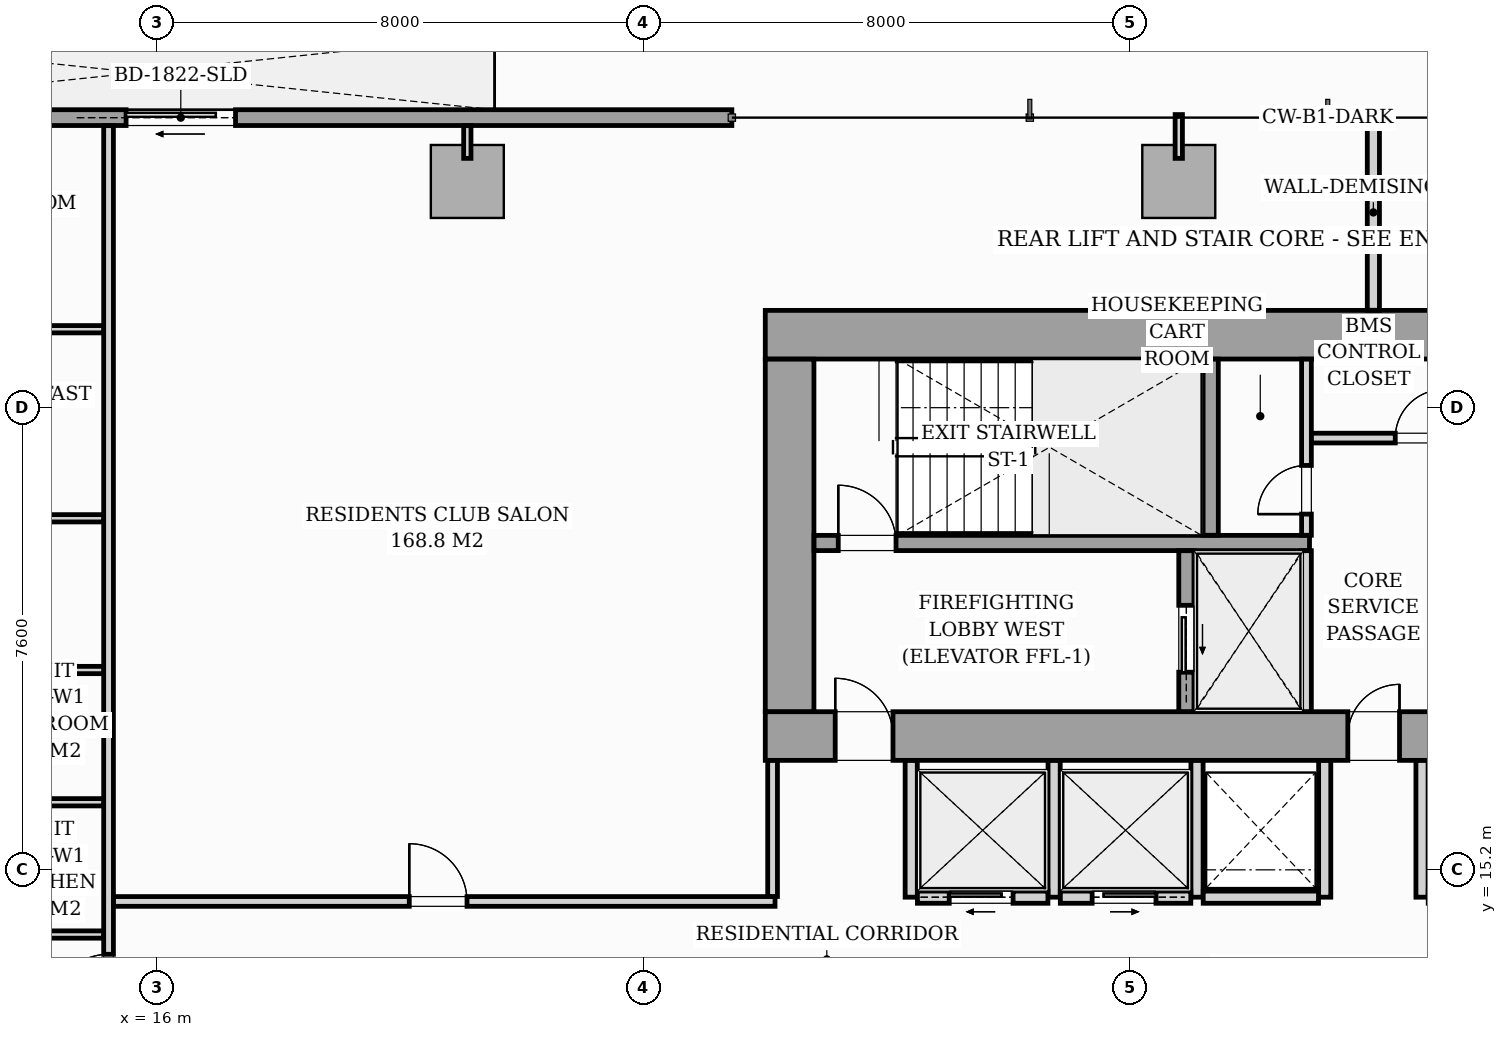
"""IFC4 building model, lengths in metres.
Left out: names, types, materials, properties, quantities, classifications, styles, units other than length and angle.
Written with IfcOpenShell. Run it as: python <this file> out.ifc"""

import sys

from ifc_helpers import new_model, si_unit, direction, frame, frame_2d, origin, origin_2d, place, context, subcontext, project, spatial, rectangle, i_section, extrude, source, transform, mapped, element, fill, save


model = new_model("IFC4")
c1 = context("Model", 3, precision=1e-05, world=origin(), true_north=direction((0.0, 1.0)))
c2 = subcontext(c1, "Body", "Model", "MODEL_VIEW")
j1 = project(units=[si_unit("LENGTHUNIT", "METRE"), si_unit("PLANEANGLEUNIT", "RADIAN")], contexts=[c1])
p1 = place(None, origin())
s1 = spatial("IfcSite", under=j1, at=p1, CompositionType="ELEMENT")
p2 = place(p1, origin())
s2 = spatial("IfcBuilding", under=s1, at=p2, CompositionType="ELEMENT")
p3 = place(p2, frame((0.0, 0.0, 23.0)))
s3 = spatial("IfcBuildingStorey", under=s2, at=p3, CompositionType="ELEMENT", Elevation=23.0)
m1 = source(origin(), c2, "Body", "SweptSolid", [
    extrude(i_section(OverallWidth=0.437, OverallDepth=0.514, WebThickness=0.061, FlangeThickness=0.097, FilletRadius=0.018, at=origin_2d()), origin(), (0.0, 0.0, 1.0), 3.196),
])
for number, where, z_axis, x_axis in (
    (1, (26.4, 17.4, 0.002), (0.0, 0.0, 1.0), (1.0, 0.0, 0.0)),
    (2, (33.12, 17.4, 0.002), (0.0, 0.0, 1.0), (1.0, 0.0, 0.0)),
    (3, (26.4, 24.0, 0.002), (0.0, 0.0, 1.0), (1.0, 0.0, 0.0)),
    (4, (33.12, 24.0, 0.002), (0.0, 0.0, 1.0), (1.0, 0.0, 0.0)),
):
    element("IfcColumn", number, at=place(p3, frame(where, z_axis=z_axis, x_axis=x_axis)), inside=s3, PredefinedType="PILASTER", context=c2, shape_type="MappedRepresentation", body=[
        mapped(m1, transform((0.0, 0.0, 0.0), scale=1.0)),
    ])
m2 = source(origin(), c2, "Body", "SweptSolid", [
    extrude(rectangle(XDim=1.2, YDim=1.2, at=origin_2d()), origin(), (0.0, 0.0, 1.0), 3.194),
])
for number, where, z_axis, x_axis in (
    (5, (21.1, 26.52, 0.004), (0.0, 0.0, 1.0), (1.0, 0.0, 0.0)),
    (6, (32.8, 26.52, 0.004), (0.0, 0.0, 1.0), (1.0, 0.0, 0.0)),
):
    element("IfcColumn", number, at=place(p3, frame(where, z_axis=z_axis, x_axis=x_axis)), inside=s3, PredefinedType="COLUMN", context=c2, shape_type="MappedRepresentation", body=[
        mapped(m2, transform((0.0, 0.0, 0.0), scale=1.0)),
    ])
p4 = place(p3, frame((8.3, 27.57, 0.0), z_axis=(0.0, 0.0, 1.0), x_axis=(1.0, 0.0, 0.0)))
e7 = element("IfcWall", 7, at=p4, inside=s3, PredefinedType="STANDARD", context=c2, shape_type="SweptSolid", body=[
    extrude(rectangle(XDim=17.15, YDim=0.26, at=frame_2d((8.575, 0.0))), origin(), (0.0, 0.0, 1.0), 2.94),
])
p5 = place(p4, frame((7.188, 0.0, 0.0)))
e8 = element("IfcOpeningElement", 8, at=p5, cuts=e7, PredefinedType="OPENING", context=c2, shape_type="SweptSolid", body=[
    extrude(rectangle(XDim=1.8, YDim=2.06, at=frame_2d((0.9, 1.03))), frame((0.0, 0.14, 0.0), z_axis=(0.0, -1.0, 0.0), x_axis=(1.0, 0.0, 0.0)), (0.0, 0.0, 1.0), 0.28),
])
p6 = place(p4, frame((2.05, 0.0, 0.65)))
e9 = element("IfcOpeningElement", 9, at=p6, cuts=e7, PredefinedType="OPENING", context=c2, shape_type="SweptSolid", body=[
    extrude(rectangle(XDim=1.6, YDim=1.5, at=frame_2d((0.8, 0.75))), frame((0.0, 0.14, 0.0), z_axis=(0.0, -1.0, 0.0), x_axis=(1.0, 0.0, 0.0)), (0.0, 0.0, 1.0), 0.28),
])
p7 = place(p3, frame((26.0, 17.4, 0.0), z_axis=(0.0, 0.0, 1.0), x_axis=(1.0, 0.0, 0.0)))
e10 = element("IfcWall", 10, at=p7, inside=s3, PredefinedType="SHEAR", context=c2, shape_type="SweptSolid", body=[
    extrude(rectangle(XDim=20.0, YDim=0.8, at=frame_2d((10.0, 0.0))), origin(), (0.0, 0.0, 1.0), 3.2),
])
p8 = place(p7, frame((1.15, 0.0, 0.0)))
e11 = element("IfcOpeningElement", 11, at=p8, cuts=e10, PredefinedType="OPENING", context=c2, shape_type="SweptSolid", body=[
    extrude(rectangle(XDim=0.95, YDim=2.06, at=frame_2d((0.475, 1.03))), frame((0.0, 0.41, 0.0), z_axis=(0.0, -1.0, 0.0), x_axis=(1.0, 0.0, 0.0)), (0.0, 0.0, 1.0), 0.82),
])
p9 = place(p7, frame((9.58, 0.0, 0.0)))
e12 = element("IfcOpeningElement", 12, at=p9, cuts=e10, PredefinedType="OPENING", context=c2, shape_type="SweptSolid", body=[
    extrude(rectangle(XDim=0.85, YDim=2.0, at=frame_2d((0.425, 1.0))), frame((0.0, 0.41, 0.0), z_axis=(0.0, -1.0, 0.0), x_axis=(1.0, 0.0, 0.0)), (0.0, 0.0, 1.0), 0.82),
])
p10 = place(p7, frame((17.75, 0.0, 0.0)))
e13 = element("IfcOpeningElement", 13, at=p10, cuts=e10, PredefinedType="OPENING", context=c2, shape_type="SweptSolid", body=[
    extrude(rectangle(XDim=0.95, YDim=2.06, at=frame_2d((0.475, 1.03))), frame((0.0, 0.41, 0.0), z_axis=(0.0, -1.0, 0.0), x_axis=(1.0, 0.0, 0.0)), (0.0, 0.0, 1.0), 0.82),
])
p11 = place(p3, frame((26.0, 24.0, 0.0), z_axis=(0.0, 0.0, 1.0), x_axis=(1.0, 0.0, 0.0)))
e14 = element("IfcWall", 14, at=p11, inside=s3, PredefinedType="SHEAR", context=c2, shape_type="SweptSolid", body=[
    extrude(rectangle(XDim=20.0, YDim=0.8, at=frame_2d((10.0, 0.0))), origin(), (0.0, 0.0, 1.0), 3.2),
])
p12 = place(p3, frame((26.4, 17.802, 0.0), z_axis=(0.0, 0.0, 1.0), x_axis=(0.0, 1.0, 0.0)))
e15 = element("IfcWall", 15, at=p12, inside=s3, PredefinedType="SHEAR", context=c2, shape_type="SweptSolid", body=[
    extrude(rectangle(XDim=5.796, YDim=0.8, at=frame_2d((2.898, 0.0))), origin(), (0.0, 0.0, 1.0), 3.2),
])
p13 = place(p3, frame((26.802, 20.575, 0.0), z_axis=(0.0, 0.0, 1.0), x_axis=(1.0, 0.0, 0.0)))
e16 = element("IfcWall", 16, at=p13, inside=s3, PredefinedType="SOLIDWALL", context=c2, shape_type="SweptSolid", body=[
    extrude(rectangle(XDim=8.148, YDim=0.25, at=frame_2d((4.074, 0.0))), origin(), (0.0, 0.0, 1.0), 3.2),
])
p14 = place(p13, frame((0.398, 0.0, 0.0)))
e17 = element("IfcOpeningElement", 17, at=p14, cuts=e16, PredefinedType="OPENING", context=c2, shape_type="SweptSolid", body=[
    extrude(rectangle(XDim=0.95, YDim=2.06, at=frame_2d((0.475, 1.03))), frame((0.0, 0.135, 0.0), z_axis=(0.0, -1.0, 0.0), x_axis=(1.0, 0.0, 0.0)), (0.0, 0.0, 1.0), 0.27),
])
p15 = place(p3, frame((33.325, 20.702, 0.0), z_axis=(0.0, 0.0, 1.0), x_axis=(0.0, 1.0, 0.0)))
e18 = element("IfcWall", 18, at=p15, inside=s3, PredefinedType="SOLIDWALL", context=c2, shape_type="SweptSolid", body=[
    extrude(rectangle(XDim=2.896, YDim=0.25, at=frame_2d((1.448, 0.0))), origin(), (0.0, 0.0, 1.0), 3.2),
])
p16 = place(p3, frame((32.925, 17.802, 0.0), z_axis=(0.0, 0.0, 1.0), x_axis=(0.0, 1.0, 0.0)))
e19 = element("IfcWall", 19, at=p16, inside=s3, PredefinedType="SOLIDWALL", context=c2, shape_type="SweptSolid", body=[
    extrude(rectangle(XDim=2.646, YDim=0.25, at=frame_2d((1.323, 0.0))), origin(), (0.0, 0.0, 1.0), 3.2),
])
p17 = place(p16, frame((0.648, 0.0, 0.0)))
e20 = element("IfcOpeningElement", 20, at=p17, cuts=e19, PredefinedType="OPENING", context=c2, shape_type="SweptSolid", body=[
    extrude(rectangle(XDim=1.1, YDim=2.08, at=frame_2d((0.55, 1.04))), frame((0.0, 0.135, 0.0), z_axis=(0.0, -1.0, 0.0), x_axis=(1.0, 0.0, 0.0)), (0.0, 0.0, 1.0), 0.27),
])
p18 = place(p3, frame((34.9, 17.802, 0.0), z_axis=(0.0, 0.0, 1.0), x_axis=(0.0, 1.0, 0.0)))
e21 = element("IfcWall", 21, at=p18, inside=s3, PredefinedType="PARTITIONING", context=c2, shape_type="SweptSolid", body=[
    extrude(rectangle(XDim=2.646, YDim=0.16, at=frame_2d((1.323, 0.0))), origin(), (0.0, 0.0, 1.0), 2.94),
])
p19 = place(p3, frame((34.9, 20.702, 0.0), z_axis=(0.0, 0.0, 1.0), x_axis=(0.0, 1.0, 0.0)))
e22 = element("IfcWall", 22, at=p19, inside=s3, PredefinedType="PARTITIONING", context=c2, shape_type="SweptSolid", body=[
    extrude(rectangle(XDim=2.896, YDim=0.16, at=frame_2d((1.448, 0.0))), origin(), (0.0, 0.0, 1.0), 2.94),
])
p20 = place(p19, frame((0.348, 0.0, 0.0)))
e23 = element("IfcOpeningElement", 23, at=p20, cuts=e22, PredefinedType="OPENING", context=c2, shape_type="SweptSolid", body=[
    extrude(rectangle(XDim=0.8, YDim=2.05, at=frame_2d((0.4, 1.025))), frame((0.0, 0.09, 0.0), z_axis=(0.0, -1.0, 0.0), x_axis=(1.0, 0.0, 0.0)), (0.0, 0.0, 1.0), 0.18),
])
p21 = place(p3, frame((34.982, 22.3, 0.0), z_axis=(0.0, 0.0, 1.0), x_axis=(1.0, 0.0, 0.0)))
e24 = element("IfcWall", 24, at=p21, inside=s3, PredefinedType="PARTITIONING", context=c2, shape_type="SweptSolid", body=[
    extrude(rectangle(XDim=3.566, YDim=0.16, at=frame_2d((1.783, 0.0))), origin(), (0.0, 0.0, 1.0), 2.94),
])
p22 = place(p21, frame((1.378, 0.0, 0.0)))
e25 = element("IfcOpeningElement", 25, at=p22, cuts=e24, PredefinedType="OPENING", context=c2, shape_type="SweptSolid", body=[
    extrude(rectangle(XDim=0.8, YDim=2.05, at=frame_2d((0.4, 1.025))), frame((0.0, 0.09, 0.0), z_axis=(0.0, -1.0, 0.0), x_axis=(1.0, 0.0, 0.0)), (0.0, 0.0, 1.0), 0.18),
])
for number, where, z_axis, x_axis in (
    (26, (28.4, 14.75, 0.0), (0.0, 0.0, 1.0), (0.0, 1.0, 0.0)),
    (27, (30.75, 14.75, 0.0), (0.0, 0.0, 1.0), (0.0, 1.0, 0.0)),
    (28, (33.1, 14.75, 0.0), (0.0, 0.0, 1.0), (0.0, 1.0, 0.0)),
):
    element("IfcWall", number, at=place(p3, frame(where, z_axis=z_axis, x_axis=x_axis)), inside=s3, PredefinedType="PARTITIONING", context=c2, shape_type="SweptSolid", body=[
        extrude(rectangle(XDim=2.248, YDim=0.2, at=frame_2d((1.124, 0.0))), origin(), (0.0, 0.0, 1.0), 2.94),
    ])
p23 = place(p3, frame((28.502, 14.75, 0.0), z_axis=(0.0, 0.0, 1.0), x_axis=(1.0, 0.0, 0.0)))
e29 = element("IfcWall", 29, at=p23, inside=s3, PredefinedType="PARTITIONING", context=c2, shape_type="SweptSolid", body=[
    extrude(rectangle(XDim=2.146, YDim=0.2, at=frame_2d((1.073, 0.0))), origin(), (0.0, 0.0, 1.0), 2.94),
])
p24 = place(p23, frame((0.523, 0.0, 0.0)))
e30 = element("IfcOpeningElement", 30, at=p24, cuts=e29, PredefinedType="OPENING", context=c2, shape_type="SweptSolid", body=[
    extrude(rectangle(XDim=1.05, YDim=2.08, at=frame_2d((0.525, 1.04))), frame((0.0, 0.11, 0.0), z_axis=(0.0, -1.0, 0.0), x_axis=(1.0, 0.0, 0.0)), (0.0, 0.0, 1.0), 0.22),
])
p25 = place(p3, frame((30.852, 14.75, 0.0), z_axis=(0.0, 0.0, 1.0), x_axis=(1.0, 0.0, 0.0)))
e31 = element("IfcWall", 31, at=p25, inside=s3, PredefinedType="PARTITIONING", context=c2, shape_type="SweptSolid", body=[
    extrude(rectangle(XDim=2.146, YDim=0.2, at=frame_2d((1.073, 0.0))), origin(), (0.0, 0.0, 1.0), 2.94),
])
p26 = place(p25, frame((0.523, 0.0, 0.0)))
e32 = element("IfcOpeningElement", 32, at=p26, cuts=e31, PredefinedType="OPENING", context=c2, shape_type="SweptSolid", body=[
    extrude(rectangle(XDim=1.05, YDim=2.08, at=frame_2d((0.525, 1.04))), frame((0.0, 0.11, 0.0), z_axis=(0.0, -1.0, 0.0), x_axis=(1.0, 0.0, 0.0)), (0.0, 0.0, 1.0), 0.22),
])
p27 = place(p3, frame((35.2, 14.75, 0.0), z_axis=(0.0, 0.0, 1.0), x_axis=(0.0, 1.0, 0.0)))
e33 = element("IfcWall", 33, at=p27, inside=s3, PredefinedType="PARTITIONING", context=c2, shape_type="SweptSolid", body=[
    extrude(rectangle(XDim=2.248, YDim=0.2, at=frame_2d((1.124, 0.0))), origin(), (0.0, 0.0, 1.0), 2.94),
])
p28 = place(p3, frame((33.202, 14.75, 0.0), z_axis=(0.0, 0.0, 1.0), x_axis=(1.0, 0.0, 0.0)))
e34 = element("IfcWall", 34, at=p28, inside=s3, PredefinedType="PARTITIONING", context=c2, shape_type="SweptSolid", body=[
    extrude(rectangle(XDim=1.896, YDim=0.2, at=frame_2d((0.948, 0.0))), origin(), (0.0, 0.0, 1.0), 2.94),
])
p29 = place(p3, frame((36.8, 14.75, 0.0), z_axis=(0.0, 0.0, 1.0), x_axis=(0.0, 1.0, 0.0)))
e35 = element("IfcWall", 35, at=p29, inside=s3, PredefinedType="PARTITIONING", context=c2, shape_type="SweptSolid", body=[
    extrude(rectangle(XDim=2.248, YDim=0.2, at=frame_2d((1.124, 0.0))), origin(), (0.0, 0.0, 1.0), 2.94),
])
p30 = place(p3, frame((15.2, 12.432, 0.0), z_axis=(0.0, 0.0, 1.0), x_axis=(0.0, 1.0, 0.0)))
e36 = element("IfcWall", 36, at=p30, inside=s3, PredefinedType="PARTITIONING", context=c2, shape_type="SweptSolid", body=[
    extrude(rectangle(XDim=15.006, YDim=0.16, at=frame_2d((7.503, 0.0))), origin(), (0.0, 0.0, 1.0), 2.94),
])
p31 = place(p30, frame((0.429, 0.0, 0.0)))
e37 = element("IfcOpeningElement", 37, at=p31, cuts=e36, PredefinedType="OPENING", context=c2, shape_type="SweptSolid", body=[
    extrude(rectangle(XDim=0.95, YDim=2.06, at=frame_2d((0.475, 1.03))), frame((0.0, 0.09, 0.0), z_axis=(0.0, -1.0, 0.0), x_axis=(1.0, 0.0, 0.0)), (0.0, 0.0, 1.0), 0.18),
])
p32 = place(p3, frame((36.0, 24.402, 0.0), z_axis=(0.0, 0.0, 1.0), x_axis=(0.0, 1.0, 0.0)))
e38 = element("IfcWall", 38, at=p32, inside=s3, PredefinedType="PARTITIONING", context=c2, shape_type="SweptSolid", body=[
    extrude(rectangle(XDim=3.218, YDim=0.2, at=frame_2d((1.609, 0.0))), origin(), (0.0, 0.0, 1.0), 2.94),
])
p33 = place(p3, frame((12.862, 16.311, 0.0), z_axis=(0.0, 0.0, 1.0), x_axis=(1.0, 0.0, 0.0)))
e39 = element("IfcWall", 39, at=p33, inside=s3, PredefinedType="PARTITIONING", context=c2, shape_type="SweptSolid", body=[
    extrude(rectangle(XDim=2.256, YDim=0.12, at=frame_2d((1.128, 0.0))), origin(), (0.0, 0.0, 1.0), 2.045),
])
for number, where, z_axis, x_axis in (
    (40, (12.862, 14.136, 0.0), (0.0, 0.0, 1.0), (1.0, 0.0, 0.0)),
    (41, (12.862, 18.486, 0.0), (0.0, 0.0, 1.0), (1.0, 0.0, 0.0)),
):
    element("IfcWall", number, at=place(p3, frame(where, z_axis=z_axis, x_axis=x_axis)), inside=s3, PredefinedType="PARTITIONING", context=c2, shape_type="SweptSolid", body=[
        extrude(rectangle(XDim=2.256, YDim=0.12, at=frame_2d((1.128, 0.0))), origin(), (0.0, 0.0, 1.0), 2.94),
    ])
p34 = place(p3, frame((5.88, 24.09, 0.0), z_axis=(0.0, 0.0, 1.0), x_axis=(1.0, 0.0, 0.0)))
e42 = element("IfcWall", 42, at=p34, inside=s3, PredefinedType="PARTITIONING", context=c2, shape_type="SweptSolid", body=[
    extrude(rectangle(XDim=9.238, YDim=0.12, at=frame_2d((4.619, 0.0))), origin(), (0.0, 0.0, 1.0), 2.94),
])
p35 = place(p34, frame((4.185, 0.0, 0.0)))
e43 = element("IfcOpeningElement", 43, at=p35, cuts=e42, PredefinedType="OPENING", context=c2, shape_type="SweptSolid", body=[
    extrude(rectangle(XDim=0.85, YDim=2.05, at=frame_2d((0.425, 1.025))), frame((0.0, 0.07, 0.0), z_axis=(0.0, -1.0, 0.0), x_axis=(1.0, 0.0, 0.0)), (0.0, 0.0, 1.0), 0.14),
])
p36 = place(p3, frame((5.88, 20.981, 0.0), z_axis=(0.0, 0.0, 1.0), x_axis=(1.0, 0.0, 0.0)))
e44 = element("IfcWall", 44, at=p36, inside=s3, PredefinedType="PARTITIONING", context=c2, shape_type="SweptSolid", body=[
    extrude(rectangle(XDim=9.238, YDim=0.12, at=frame_2d((4.619, 0.0))), origin(), (0.0, 0.0, 1.0), 2.94),
])
p37 = place(p36, frame((4.185, 0.0, 0.0)))
e45 = element("IfcOpeningElement", 45, at=p37, cuts=e44, PredefinedType="OPENING", context=c2, shape_type="SweptSolid", body=[
    extrude(rectangle(XDim=0.85, YDim=2.05, at=frame_2d((0.425, 1.025))), frame((0.0, 0.07, 0.0), z_axis=(0.0, -1.0, 0.0), x_axis=(1.0, 0.0, 0.0)), (0.0, 0.0, 1.0), 0.14),
])
p38 = place(p3, frame((15.282, 14.68, 0.0), z_axis=(0.0, 0.0, 1.0), x_axis=(1.0, 0.0, 0.0)))
e46 = element("IfcWall", 46, at=p38, inside=s3, PredefinedType="PARTITIONING", context=c2, shape_type="SweptSolid", body=[
    extrude(rectangle(XDim=10.878, YDim=0.16, at=frame_2d((5.439, 0.0))), origin(), (0.0, 0.0, 1.0), 2.94),
])
p39 = place(p38, frame((4.863, 0.0, 0.0)))
e47 = element("IfcOpeningElement", 47, at=p39, cuts=e46, PredefinedType="OPENING", context=c2, shape_type="SweptSolid", body=[
    extrude(rectangle(XDim=0.95, YDim=2.06, at=frame_2d((0.475, 1.03))), frame((0.0, 0.09, 0.0), z_axis=(0.0, -1.0, 0.0), x_axis=(1.0, 0.0, 0.0)), (0.0, 0.0, 1.0), 0.18),
])
p40 = place(p3, frame((26.12, 14.762, 0.0), z_axis=(0.0, 0.0, 1.0), x_axis=(0.0, 1.0, 0.0)))
e48 = element("IfcWall", 48, at=p40, inside=s3, PredefinedType="PARTITIONING", context=c2, shape_type="SweptSolid", body=[
    extrude(rectangle(XDim=2.236, YDim=0.16, at=frame_2d((1.118, 0.0))), origin(), (0.0, 0.0, 1.0), 2.94),
])
p41 = place(p3, frame((21.1, 26.9, 0.0), z_axis=(0.0, 0.0, 1.0), x_axis=(0.0, 1.0, 0.0)))
e49 = element("IfcWall", 49, at=p41, inside=s3, PredefinedType="PARTITIONING", context=c2, shape_type="SweptSolid", body=[
    extrude(rectangle(XDim=0.538, YDim=0.12, at=frame_2d((0.269, 0.0))), origin(), (0.0, 0.0, 1.0), 2.94),
])
p42 = place(p3, frame((32.8, 26.9, 0.0), z_axis=(0.0, 0.0, 1.0), x_axis=(0.0, 1.0, 0.0)))
e50 = element("IfcWall", 50, at=p42, inside=s3, PredefinedType="PARTITIONING", context=c2, shape_type="SweptSolid", body=[
    extrude(rectangle(XDim=0.72, YDim=0.12, at=frame_2d((0.36, 0.0))), origin(), (0.0, 0.0, 1.0), 2.94),
])
m3 = source(origin(), c2, "Body", "SweptSolid", [
    extrude(rectangle(XDim=1.8, YDim=2.06, at=frame_2d((0.9, 1.03))), frame((0.0, 0.025, 0.0), z_axis=(0.0, -1.0, 0.0), x_axis=(1.0, 0.0, 0.0)), (0.0, 0.0, 1.0), 0.05),
])
p43 = place(p5, origin())
e51 = element("IfcDoor", 51, at=p43, inside=s3, OperationType="SLIDING_TO_LEFT", PredefinedType="DOOR", context=c2, shape_type="MappedRepresentation", body=[
    mapped(m3, transform((0.0, 0.0, 0.0), scale=1.0)),
])
fill(e8, e51)
m4 = source(origin(), c2, "Body", "SweptSolid", [
    extrude(rectangle(XDim=0.95, YDim=2.06, at=frame_2d((0.475, 1.03))), frame((0.0, 0.025, 0.0), z_axis=(0.0, -1.0, 0.0), x_axis=(1.0, 0.0, 0.0)), (0.0, 0.0, 1.0), 0.05),
])
p44 = place(p8, origin())
e52 = element("IfcDoor", 52, at=p44, inside=s3, OperationType="SINGLE_SWING_LEFT", PredefinedType="DOOR", context=c2, shape_type="MappedRepresentation", body=[
    mapped(m4, transform((0.0, 0.0, 0.0), scale=1.0)),
])
fill(e11, e52)
m5 = source(origin(), c2, "Body", "SweptSolid", [
    extrude(rectangle(XDim=0.85, YDim=2.0, at=frame_2d((0.425, 1.0))), frame((0.0, 0.025, 0.0), z_axis=(0.0, -1.0, 0.0), x_axis=(1.0, 0.0, 0.0)), (0.0, 0.0, 1.0), 0.05),
])
p45 = place(p9, origin())
e53 = element("IfcDoor", 53, at=p45, inside=s3, OperationType="SINGLE_SWING_RIGHT", PredefinedType="DOOR", context=c2, shape_type="MappedRepresentation", body=[
    mapped(m5, transform((0.0, 0.0, 0.0), scale=1.0)),
])
fill(e12, e53)
p46 = place(p14, origin())
e54 = element("IfcDoor", 54, at=p46, inside=s3, OperationType="SINGLE_SWING_LEFT", PredefinedType="DOOR", context=c2, shape_type="MappedRepresentation", body=[
    mapped(m4, transform((0.0, 0.0, 0.0), scale=1.0)),
])
fill(e17, e54)
m6 = source(origin(), c2, "Body", "SweptSolid", [
    extrude(rectangle(XDim=1.1, YDim=2.08, at=frame_2d((0.55, 1.04))), frame((0.0, 0.025, 0.0), z_axis=(0.0, -1.0, 0.0), x_axis=(1.0, 0.0, 0.0)), (0.0, 0.0, 1.0), 0.05),
])
p47 = place(p17, origin())
e55 = element("IfcDoor", 55, at=p47, inside=s3, OperationType="SLIDING_TO_LEFT", PredefinedType="DOOR", context=c2, shape_type="MappedRepresentation", body=[
    mapped(m6, transform((0.0, 0.0, 0.0), scale=1.0)),
])
fill(e20, e55)
m7 = source(origin(), c2, "Body", "SweptSolid", [
    extrude(rectangle(XDim=0.8, YDim=2.05, at=frame_2d((0.4, 1.025))), frame((0.0, 0.025, 0.0), z_axis=(0.0, -1.0, 0.0), x_axis=(1.0, 0.0, 0.0)), (0.0, 0.0, 1.0), 0.05),
])
p48 = place(p20, origin())
e56 = element("IfcDoor", 56, at=p48, inside=s3, OperationType="SINGLE_SWING_LEFT", PredefinedType="DOOR", context=c2, shape_type="MappedRepresentation", body=[
    mapped(m7, transform((0.0, 0.0, 0.0), scale=1.0)),
])
fill(e23, e56)
p49 = place(p22, origin())
e57 = element("IfcDoor", 57, at=p49, inside=s3, OperationType="SINGLE_SWING_RIGHT", PredefinedType="DOOR", context=c2, shape_type="MappedRepresentation", body=[
    mapped(m7, transform((0.0, 0.0, 0.0), scale=1.0)),
])
fill(e25, e57)
m8 = source(origin(), c2, "Body", "SweptSolid", [
    extrude(rectangle(XDim=1.05, YDim=2.08, at=frame_2d((0.525, 1.04))), frame((0.0, 0.025, 0.0), z_axis=(0.0, -1.0, 0.0), x_axis=(1.0, 0.0, 0.0)), (0.0, 0.0, 1.0), 0.05),
])
p50 = place(p24, origin())
e58 = element("IfcDoor", 58, at=p50, inside=s3, OperationType="SLIDING_TO_LEFT", PredefinedType="DOOR", context=c2, shape_type="MappedRepresentation", body=[
    mapped(m8, transform((0.0, 0.0, 0.0), scale=1.0)),
])
fill(e30, e58)
p51 = place(p26, origin())
e59 = element("IfcDoor", 59, at=p51, inside=s3, OperationType="SLIDING_TO_RIGHT", PredefinedType="DOOR", context=c2, shape_type="MappedRepresentation", body=[
    mapped(m8, transform((0.0, 0.0, 0.0), scale=1.0)),
])
fill(e32, e59)
m9 = source(origin(), c2, "Body", "SweptSolid", [
    extrude(rectangle(XDim=0.95, YDim=2.06, at=frame_2d((0.475, 1.03))), frame((0.0, 0.025, 0.0), z_axis=(0.0, -1.0, 0.0), x_axis=(1.0, 0.0, 0.0)), (0.0, 0.0, 1.0), 0.05),
])
p52 = place(p31, origin())
e60 = element("IfcDoor", 60, at=p52, inside=s3, OperationType="SINGLE_SWING_LEFT", PredefinedType="DOOR", context=c2, shape_type="MappedRepresentation", body=[
    mapped(m9, transform((0.0, 0.0, 0.0), scale=1.0)),
])
fill(e37, e60)
p53 = place(p39, origin())
e61 = element("IfcDoor", 61, at=p53, inside=s3, OperationType="SINGLE_SWING_LEFT", PredefinedType="DOOR", context=c2, shape_type="MappedRepresentation", body=[
    mapped(m9, transform((0.0, 0.0, 0.0), scale=1.0)),
])
fill(e47, e61)
save(model, sys.argv[1])
